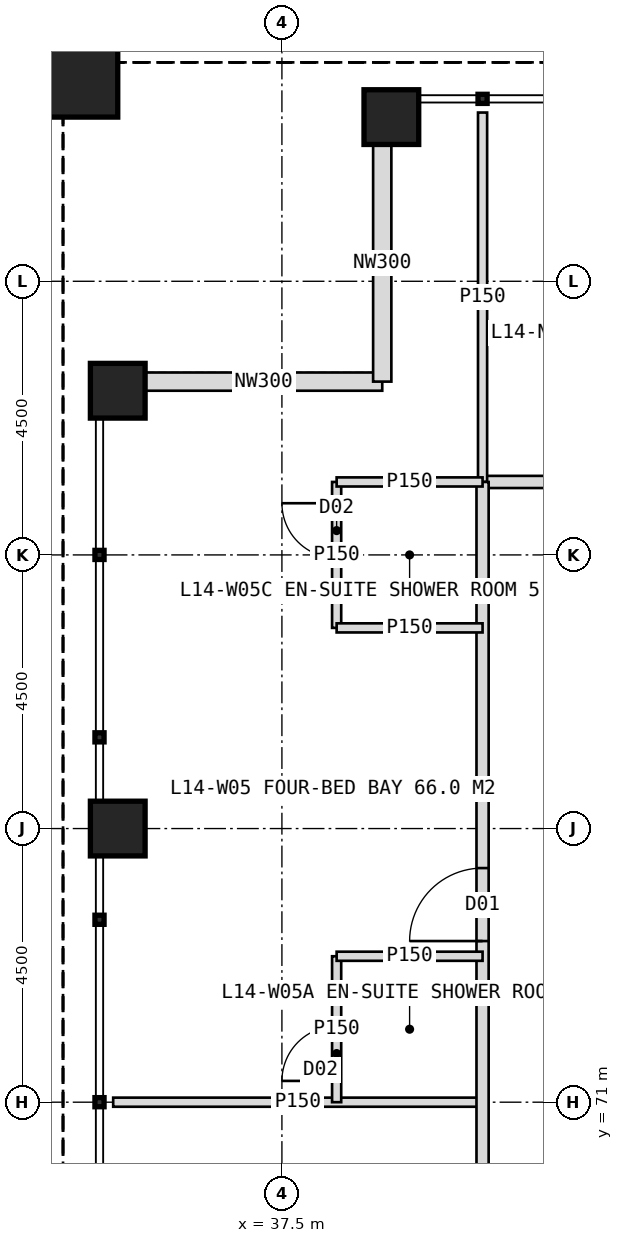
"""IFC4 building model, lengths in metres.
Left out: names, types, materials, properties, quantities, classifications, styles, units other than length and angle.
Written with IfcOpenShell. Run it as: python <this file> out.ifc"""

import sys

from ifc_helpers import new_model, si_unit, direction, frame, frame_2d, origin, origin_2d, place, context, subcontext, project, spatial, rectangle, hollow_rectangle, extrude, element, fill, save


model = new_model("IFC4")
c1 = context("Model", 3, precision=1e-05, world=origin(), true_north=direction((0.0, 1.0)))
c2 = subcontext(c1, "Body", "Model", "MODEL_VIEW")
j1 = project(units=[si_unit("LENGTHUNIT", "METRE"), si_unit("PLANEANGLEUNIT", "RADIAN")], contexts=[c1])
p1 = place(None, origin())
s1 = spatial("IfcSite", under=j1, at=p1, CompositionType="ELEMENT")
p2 = place(p1, origin())
s2 = spatial("IfcBuilding", under=s1, at=p2, CompositionType="ELEMENT")
p3 = place(p2, frame((0.0, 0.0, 63.0)))
s3 = spatial("IfcBuildingStorey", under=s2, at=p3, CompositionType="ELEMENT", Elevation=63.0)
for number, where, z_axis, x_axis in (
    (1, (39.3, 87.2, 0.0), (0.0, 0.0, 1.0), (1.0, 0.0, 0.0)),
    (2, (34.8, 75.5, 0.0), (0.0, 0.0, 1.0), (1.0, 0.0, 0.0)),
    (3, (34.8, 82.7, 0.0), (0.0, 0.0, 1.0), (1.0, 0.0, 0.0)),
):
    element("IfcColumn", number, at=place(p3, frame(where, z_axis=z_axis, x_axis=x_axis)), inside=s3, PredefinedType="COLUMN", context=c2, shape_type="SweptSolid", body=[
        extrude(hollow_rectangle(XDim=0.9, YDim=0.9, WallThickness=0.08, at=origin_2d()), origin(), (0.0, 0.0, 1.0), 4.0),
    ])
p4 = place(p3, frame((33.9, 88.1, 0.0), z_axis=(0.0, 0.0, 1.0), x_axis=(1.0, 0.0, 0.0)))
e4 = element("IfcColumn", 4, at=p4, inside=s3, PredefinedType="COLUMN", context=c2, shape_type="SweptSolid", body=[
    extrude(hollow_rectangle(XDim=1.8, YDim=1.8, WallThickness=0.1, at=origin_2d()), origin(), (0.0, 0.0, 1.0), 4.0),
])
for number, where, z_axis, x_axis in (
    (5, (35.25, 82.85, 0.0), (0.0, 0.0, 1.0), (1.0, 0.0, 0.0)),
    (6, (39.15, 82.85, 0.0), (0.0, 0.0, 1.0), (0.0, 1.0, 0.0)),
):
    element("IfcWall", number, at=place(p3, frame(where, z_axis=z_axis, x_axis=x_axis)), inside=s3, PredefinedType="ELEMENTEDWALL", context=c2, shape_type="SweptSolid", body=[
        extrude(rectangle(XDim=3.9, YDim=0.3, at=frame_2d((1.95, 0.0))), origin(), (0.0, 0.0, 1.0), 2.95),
    ])
p5 = place(p3, frame((40.8, 81.2, 0.0), z_axis=(0.0, 0.0, 1.0), x_axis=(1.0, 0.0, 0.0)))
e7 = element("IfcWall", 7, at=p5, inside=s3, PredefinedType="PARTITIONING", context=c2, shape_type="SweptSolid", body=[
    extrude(rectangle(XDim=38.4, YDim=0.2, at=frame_2d((19.2, 0.0))), origin(), (0.0, 0.0, 1.0), 3.75),
])
p6 = place(p5, frame((4.5, 0.0, 0.0)))
e8 = element("IfcOpeningElement", 8, at=p6, cuts=e7, PredefinedType="OPENING", context=c2, shape_type="SweptSolid", body=[
    extrude(rectangle(XDim=1.2, YDim=2.2, at=frame_2d((0.6, 1.1))), frame((0.0, 0.11, 0.0), z_axis=(0.0, -1.0, 0.0), x_axis=(1.0, 0.0, 0.0)), (0.0, 0.0, 1.0), 0.22),
])
p7 = place(p5, frame((13.45, 0.0, 0.0)))
e9 = element("IfcOpeningElement", 9, at=p7, cuts=e7, PredefinedType="OPENING", context=c2, shape_type="SweptSolid", body=[
    extrude(rectangle(XDim=1.2, YDim=2.2, at=frame_2d((0.6, 1.1))), frame((0.0, 0.11, 0.0), z_axis=(0.0, -1.0, 0.0), x_axis=(1.0, 0.0, 0.0)), (0.0, 0.0, 1.0), 0.22),
])
p8 = place(p5, frame((22.45, 0.0, 0.0)))
e10 = element("IfcOpeningElement", 10, at=p8, cuts=e7, PredefinedType="OPENING", context=c2, shape_type="SweptSolid", body=[
    extrude(rectangle(XDim=1.2, YDim=2.2, at=frame_2d((0.6, 1.1))), frame((0.0, 0.11, 0.0), z_axis=(0.0, -1.0, 0.0), x_axis=(1.0, 0.0, 0.0)), (0.0, 0.0, 1.0), 0.22),
])
p9 = place(p5, frame((30.85, 0.0, 0.0)))
e11 = element("IfcOpeningElement", 11, at=p9, cuts=e7, PredefinedType="OPENING", context=c2, shape_type="SweptSolid", body=[
    extrude(rectangle(XDim=1.2, YDim=2.2, at=frame_2d((0.6, 1.1))), frame((0.0, 0.11, 0.0), z_axis=(0.0, -1.0, 0.0), x_axis=(1.0, 0.0, 0.0)), (0.0, 0.0, 1.0), 0.22),
])
for number, where, z_axis, x_axis in (
    (12, (40.8, 81.2, 0.0), (0.0, 0.0, 1.0), (0.0, 1.0, 0.0)),
    (13, (40.8, 71.0, 0.0), (0.0, 0.0, 1.0), (-1.0, 0.0, 0.0)),
):
    element("IfcWall", number, at=place(p3, frame(where, z_axis=z_axis, x_axis=x_axis)), inside=s3, PredefinedType="PARTITIONING", context=c2, shape_type="SweptSolid", body=[
        extrude(rectangle(XDim=6.075, YDim=0.15, at=frame_2d((3.038, 0.0))), origin(), (0.0, 0.0, 1.0), 3.75),
    ])
p10 = place(p3, frame((40.8, 42.8, 0.0), z_axis=(0.0, 0.0, 1.0), x_axis=(0.0, 1.0, 0.0)))
e14 = element("IfcWall", 14, at=p10, inside=s3, PredefinedType="PARTITIONING", context=c2, shape_type="SweptSolid", body=[
    extrude(rectangle(XDim=38.4, YDim=0.2, at=frame_2d((19.2, 0.0))), origin(), (0.0, 0.0, 1.0), 3.75),
])
p11 = place(p10, frame((3.25, 0.0, 0.0)))
e15 = element("IfcOpeningElement", 15, at=p11, cuts=e14, PredefinedType="OPENING", context=c2, shape_type="SweptSolid", body=[
    extrude(rectangle(XDim=1.2, YDim=2.2, at=frame_2d((0.6, 1.1))), frame((0.0, 0.11, 0.0), z_axis=(0.0, -1.0, 0.0), x_axis=(1.0, 0.0, 0.0)), (0.0, 0.0, 1.0), 0.22),
])
p12 = place(p10, frame((9.85, 0.0, 0.0)))
e16 = element("IfcOpeningElement", 16, at=p12, cuts=e14, PredefinedType="OPENING", context=c2, shape_type="SweptSolid", body=[
    extrude(rectangle(XDim=1.2, YDim=2.2, at=frame_2d((0.6, 1.1))), frame((0.0, 0.11, 0.0), z_axis=(0.0, -1.0, 0.0), x_axis=(1.0, 0.0, 0.0)), (0.0, 0.0, 1.0), 0.22),
])
p13 = place(p10, frame((15.85, 0.0, 0.0)))
e17 = element("IfcOpeningElement", 17, at=p13, cuts=e14, PredefinedType="OPENING", context=c2, shape_type="SweptSolid", body=[
    extrude(rectangle(XDim=1.2, YDim=2.2, at=frame_2d((0.6, 1.1))), frame((0.0, 0.11, 0.0), z_axis=(0.0, -1.0, 0.0), x_axis=(1.0, 0.0, 0.0)), (0.0, 0.0, 1.0), 0.22),
])
p14 = place(p10, frame((22.45, 0.0, 0.0)))
e18 = element("IfcOpeningElement", 18, at=p14, cuts=e14, PredefinedType="OPENING", context=c2, shape_type="SweptSolid", body=[
    extrude(rectangle(XDim=1.2, YDim=2.2, at=frame_2d((0.6, 1.1))), frame((0.0, 0.11, 0.0), z_axis=(0.0, -1.0, 0.0), x_axis=(1.0, 0.0, 0.0)), (0.0, 0.0, 1.0), 0.22),
])
p15 = place(p10, frame((30.85, 0.0, 0.0)))
e19 = element("IfcOpeningElement", 19, at=p15, cuts=e14, PredefinedType="OPENING", context=c2, shape_type="SweptSolid", body=[
    extrude(rectangle(XDim=1.2, YDim=2.2, at=frame_2d((0.6, 1.1))), frame((0.0, 0.11, 0.0), z_axis=(0.0, -1.0, 0.0), x_axis=(1.0, 0.0, 0.0)), (0.0, 0.0, 1.0), 0.22),
])
p16 = place(p3, frame((38.4, 71.0, 0.0), z_axis=(0.0, 0.0, 1.0), x_axis=(0.0, 1.0, 0.0)))
e20 = element("IfcWall", 20, at=p16, inside=s3, PredefinedType="PARTITIONING", context=c2, shape_type="SweptSolid", body=[
    extrude(rectangle(XDim=2.4, YDim=0.15, at=frame_2d((1.2, 0.0))), origin(), (0.0, 0.0, 1.0), 3.75),
])
p17 = place(p16, frame((0.35, 0.0, 0.0)))
e21 = element("IfcOpeningElement", 21, at=p17, cuts=e20, PredefinedType="OPENING", context=c2, shape_type="SweptSolid", body=[
    extrude(rectangle(XDim=0.9, YDim=2.1, at=frame_2d((0.45, 1.05))), frame((0.0, 0.085, 0.0), z_axis=(0.0, -1.0, 0.0), x_axis=(1.0, 0.0, 0.0)), (0.0, 0.0, 1.0), 0.17),
])
p18 = place(p3, frame((40.8, 73.4, 0.0), z_axis=(0.0, 0.0, 1.0), x_axis=(-1.0, 0.0, 0.0)))
e22 = element("IfcWall", 22, at=p18, inside=s3, PredefinedType="PARTITIONING", context=c2, shape_type="SweptSolid", body=[
    extrude(rectangle(XDim=2.4, YDim=0.15, at=frame_2d((1.2, 0.0))), origin(), (0.0, 0.0, 1.0), 3.75),
])
p19 = place(p3, frame((38.4, 78.8, 0.0), z_axis=(0.0, 0.0, 1.0), x_axis=(0.0, 1.0, 0.0)))
e23 = element("IfcWall", 23, at=p19, inside=s3, PredefinedType="PARTITIONING", context=c2, shape_type="SweptSolid", body=[
    extrude(rectangle(XDim=2.4, YDim=0.15, at=frame_2d((1.2, 0.0))), origin(), (0.0, 0.0, 1.0), 3.75),
])
p20 = place(p19, frame((1.15, 0.0, 0.0)))
e24 = element("IfcOpeningElement", 24, at=p20, cuts=e23, PredefinedType="OPENING", context=c2, shape_type="SweptSolid", body=[
    extrude(rectangle(XDim=0.9, YDim=2.1, at=frame_2d((0.45, 1.05))), frame((0.0, 0.085, 0.0), z_axis=(0.0, -1.0, 0.0), x_axis=(1.0, 0.0, 0.0)), (0.0, 0.0, 1.0), 0.17),
])
for number, where, z_axis, x_axis in (
    (25, (40.8, 78.8, 0.0), (0.0, 0.0, 1.0), (-1.0, 0.0, 0.0)),
    (26, (40.8, 81.2, 0.0), (0.0, 0.0, 1.0), (-1.0, 0.0, 0.0)),
):
    element("IfcWall", number, at=place(p3, frame(where, z_axis=z_axis, x_axis=x_axis)), inside=s3, PredefinedType="PARTITIONING", context=c2, shape_type="SweptSolid", body=[
        extrude(rectangle(XDim=2.4, YDim=0.15, at=frame_2d((1.2, 0.0))), origin(), (0.0, 0.0, 1.0), 3.75),
    ])
p21 = place(p15, origin())
e27 = element("IfcDoor", 27, at=p21, inside=s3, OperationType="SINGLE_SWING_LEFT", PredefinedType="DOOR", context=c2, shape_type="SweptSolid", body=[
    extrude(rectangle(XDim=1.2, YDim=2.2, at=frame_2d((0.6, 1.1))), frame((0.0, 0.025, 0.0), z_axis=(0.0, -1.0, 0.0), x_axis=(1.0, 0.0, 0.0)), (0.0, 0.0, 1.0), 0.05),
])
fill(e19, e27)
p22 = place(p17, origin())
e28 = element("IfcDoor", 28, at=p22, inside=s3, OperationType="SINGLE_SWING_LEFT", PredefinedType="DOOR", context=c2, shape_type="SweptSolid", body=[
    extrude(rectangle(XDim=0.9, YDim=2.1, at=frame_2d((0.45, 1.05))), frame((0.0, 0.025, 0.0), z_axis=(0.0, -1.0, 0.0), x_axis=(1.0, 0.0, 0.0)), (0.0, 0.0, 1.0), 0.05),
])
fill(e21, e28)
p23 = place(p20, origin())
e29 = element("IfcDoor", 29, at=p23, inside=s3, OperationType="SINGLE_SWING_RIGHT", PredefinedType="DOOR", context=c2, shape_type="SweptSolid", body=[
    extrude(rectangle(XDim=0.9, YDim=2.1, at=frame_2d((0.45, 1.05))), frame((0.0, 0.025, 0.0), z_axis=(0.0, -1.0, 0.0), x_axis=(1.0, 0.0, 0.0)), (0.0, 0.0, 1.0), 0.05),
])
fill(e24, e29)
save(model, sys.argv[1])
